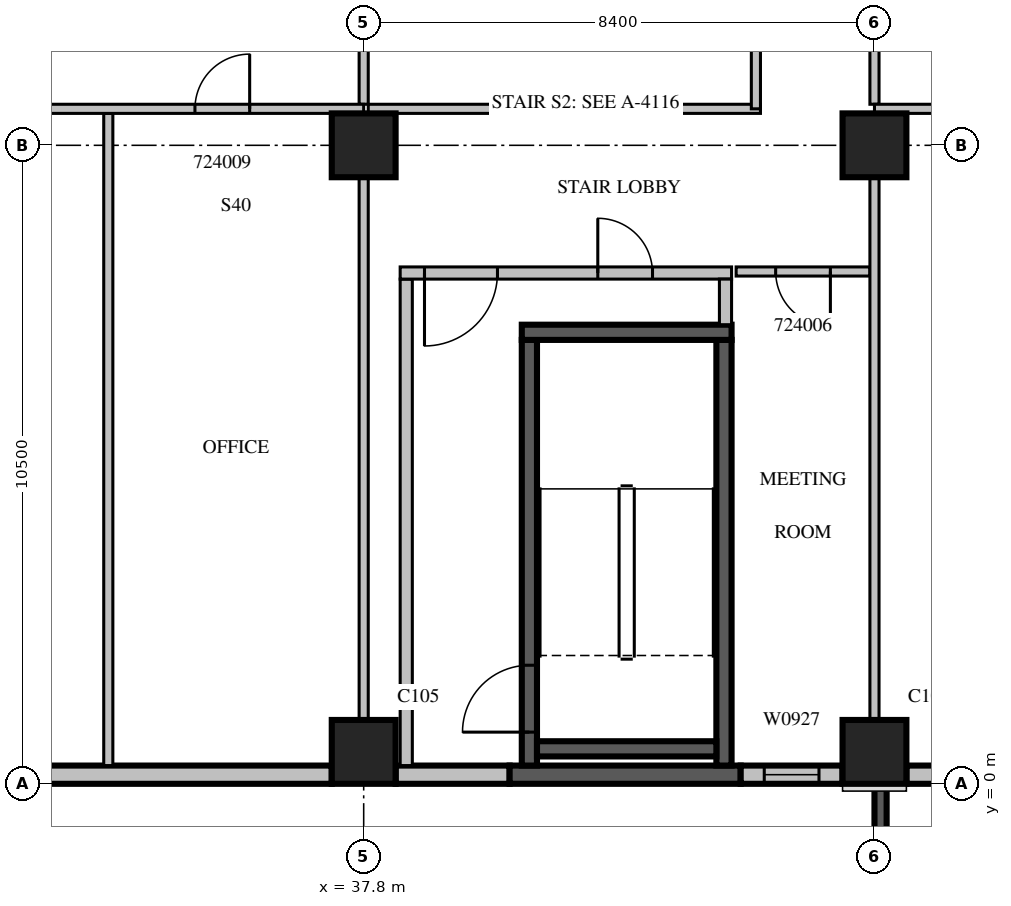
"""IFC4 building model, lengths in metres.
Left out: names, types, materials, properties, quantities, classifications, styles, units other than length and angle.
Written with IfcOpenShell. Run it as: python <this file> out.ifc"""

import sys

from ifc_helpers import new_model, si_unit, direction, frame, frame_2d, origin, origin_2d, place, context, subcontext, project, spatial, rectangle, extrude, source, transform, mapped, element, fill, save


model = new_model("IFC4")
c1 = context("Model", 3, precision=1e-05, world=origin(), true_north=direction((0.0, 1.0)))
c2 = subcontext(c1, "Body", "Model", "MODEL_VIEW")
j1 = project(units=[si_unit("LENGTHUNIT", "METRE"), si_unit("PLANEANGLEUNIT", "RADIAN")], contexts=[c1])
p1 = place(None, origin())
s1 = spatial("IfcSite", under=j1, at=p1, CompositionType="ELEMENT")
p2 = place(p1, origin())
s2 = spatial("IfcBuilding", under=s1, at=p2, CompositionType="ELEMENT")
p3 = place(p2, frame((0.0, 0.0, 111.9)))
s3 = spatial("IfcBuildingStorey", under=s2, at=p3, CompositionType="ELEMENT", Elevation=111.9)
m1 = source(origin(), c2, "Body", "SweptSolid", [
    extrude(rectangle(XDim=1.05, YDim=1.05, at=origin_2d()), origin(), (0.0, 0.0, 1.0), 4.2),
])
for number, where, z_axis, x_axis in (
    (1, (37.8, 0.525, 0.0), (0.0, 0.0, 1.0), (1.0, 0.0, 0.0)),
    (2, (46.2, 0.525, 0.0), (0.0, 0.0, 1.0), (1.0, 0.0, 0.0)),
    (3, (37.8, 10.5, 0.0), (0.0, 0.0, 1.0), (1.0, 0.0, 0.0)),
    (4, (46.2, 10.5, 0.0), (0.0, 0.0, 1.0), (1.0, 0.0, 0.0)),
):
    element("IfcColumn", number, at=place(p3, frame(where, z_axis=z_axis, x_axis=x_axis)), inside=s3, PredefinedType="COLUMN", context=c2, shape_type="MappedRepresentation", body=[
        mapped(m1, transform((0.0, 0.0, 0.0), scale=1.0)),
    ])
m2 = source(origin(), c2, "Body", "SweptSolid", [
    extrude(rectangle(XDim=3.9, YDim=0.2, at=frame_2d((1.95, 0.0))), origin(), (0.0, 0.0, 1.0), 3.8),
])
p4 = place(p3, frame((46.3, 0.0, 0.0), z_axis=(0.0, 0.0, 1.0), x_axis=(0.0, -1.0, 0.0)))
e5 = element("IfcWall", 5, at=p4, inside=s3, PredefinedType="SOLIDWALL", context=c2, shape_type="MappedRepresentation", body=[
    mapped(m2, transform((0.0, 0.0, 0.0), scale=1.0)),
])
m3 = source(origin(), c2, "Body", "SweptSolid", [
    extrude(rectangle(XDim=2.4, YDim=2.7, at=frame_2d((1.2, 1.35))), frame((0.0, 0.11, 0.0), z_axis=(0.0, -1.0, 0.0), x_axis=(1.0, 0.0, 0.0)), (0.0, 0.0, 1.0), 0.22),
])
p5 = place(p4, frame((0.75, 0.0, 0.6)))
e6 = element("IfcOpeningElement", 6, at=p5, cuts=e5, PredefinedType="OPENING", context=c2, shape_type="MappedRepresentation", body=[
    mapped(m3, transform((0.0, 0.0, 0.0), scale=1.0)),
])
m4 = source(origin(), c2, "Body", "SweptSolid", [
    extrude(rectangle(XDim=7.35, YDim=0.3, at=frame_2d((3.675, 0.0))), origin(), (0.0, 0.0, 1.0), 3.8),
])
p6 = place(p3, frame((29.925, 0.15, 0.0), z_axis=(0.0, 0.0, 1.0), x_axis=(1.0, 0.0, 0.0)))
e7 = element("IfcWall", 7, at=p6, inside=s3, PredefinedType="STANDARD", context=c2, shape_type="MappedRepresentation", body=[
    mapped(m4, transform((0.0, 0.0, 0.0), scale=1.0)),
])
m5 = source(origin(), c2, "Body", "SweptSolid", [
    extrude(rectangle(XDim=1.875, YDim=0.3, at=frame_2d((0.938, 0.0))), origin(), (0.0, 0.0, 1.0), 3.8),
])
p7 = place(p3, frame((38.325, 0.15, 0.0), z_axis=(0.0, 0.0, 1.0), x_axis=(1.0, 0.0, 0.0)))
e8 = element("IfcWall", 8, at=p7, inside=s3, PredefinedType="STANDARD", context=c2, shape_type="MappedRepresentation", body=[
    mapped(m5, transform((0.0, 0.0, 0.0), scale=1.0)),
])
m6 = source(origin(), c2, "Body", "SweptSolid", [
    extrude(rectangle(XDim=3.8, YDim=0.3, at=frame_2d((1.9, 0.0))), origin(), (0.0, 0.0, 1.0), 3.8),
])
p8 = place(p3, frame((40.2, 0.15, 0.0), z_axis=(0.0, 0.0, 1.0), x_axis=(1.0, 0.0, 0.0)))
e9 = element("IfcWall", 9, at=p8, inside=s3, PredefinedType="SOLIDWALL", context=c2, shape_type="MappedRepresentation", body=[
    mapped(m6, transform((0.0, 0.0, 0.0), scale=1.0)),
])
m7 = source(origin(), c2, "Body", "SweptSolid", [
    extrude(rectangle(XDim=1.675, YDim=0.3, at=frame_2d((0.838, 0.0))), origin(), (0.0, 0.0, 1.0), 3.8),
])
p9 = place(p3, frame((44.0, 0.15, 0.0), z_axis=(0.0, 0.0, 1.0), x_axis=(1.0, 0.0, 0.0)))
e10 = element("IfcWall", 10, at=p9, inside=s3, PredefinedType="STANDARD", context=c2, shape_type="MappedRepresentation", body=[
    mapped(m7, transform((0.0, 0.0, 0.0), scale=1.0)),
])
m8 = source(origin(), c2, "Body", "SweptSolid", [
    extrude(rectangle(XDim=0.9, YDim=2.7, at=frame_2d((0.45, 1.35))), frame((0.0, 0.16, 0.0), z_axis=(0.0, -1.0, 0.0), x_axis=(1.0, 0.0, 0.0)), (0.0, 0.0, 1.0), 0.32),
])
p10 = place(p9, frame((0.388, 0.0, 0.6)))
e11 = element("IfcOpeningElement", 11, at=p10, cuts=e10, PredefinedType="OPENING", context=c2, shape_type="MappedRepresentation", body=[
    mapped(m8, transform((0.0, 0.0, 0.0), scale=1.0)),
])
m9 = source(origin(), c2, "Body", "SweptSolid", [
    extrude(rectangle(XDim=4.83, YDim=0.3, at=frame_2d((2.415, 0.0))), origin(), (0.0, 0.0, 1.0), 3.8),
])
p11 = place(p3, frame((46.725, 0.15, 0.0), z_axis=(0.0, 0.0, 1.0), x_axis=(1.0, 0.0, 0.0)))
e12 = element("IfcWall", 12, at=p11, inside=s3, PredefinedType="STANDARD", context=c2, shape_type="MappedRepresentation", body=[
    mapped(m9, transform((0.0, 0.0, 0.0), scale=1.0)),
])
m10 = source(origin(), c2, "Body", "SweptSolid", [
    extrude(rectangle(XDim=1.0, YDim=2.1, at=frame_2d((0.5, 1.05))), frame((0.0, 0.16, 0.0), z_axis=(0.0, -1.0, 0.0), x_axis=(1.0, 0.0, 0.0)), (0.0, 0.0, 1.0), 0.32),
])
p12 = place(p11, frame((1.915, 0.0, 0.0)))
e13 = element("IfcOpeningElement", 13, at=p12, cuts=e12, PredefinedType="OPENING", context=c2, shape_type="MappedRepresentation", body=[
    mapped(m10, transform((0.0, 0.0, 0.0), scale=1.0)),
])
m11 = source(origin(), c2, "Body", "SweptSolid", [
    extrude(rectangle(XDim=7.0, YDim=0.25, at=frame_2d((3.5, 0.0))), origin(), (0.0, 0.0, 1.0), 3.8),
])
p13 = place(p3, frame((40.525, 0.3, 0.0), z_axis=(0.0, 0.0, 1.0), x_axis=(0.0, 1.0, 0.0)))
e14 = element("IfcWall", 14, at=p13, inside=s3, PredefinedType="SOLIDWALL", context=c2, shape_type="MappedRepresentation", body=[
    mapped(m11, transform((0.0, 0.0, 0.0), scale=1.0)),
])
m12 = source(origin(), c2, "Body", "SweptSolid", [
    extrude(rectangle(XDim=1.1, YDim=2.1, at=frame_2d((0.55, 1.05))), frame((0.0, 0.135, 0.0), z_axis=(0.0, -1.0, 0.0), x_axis=(1.0, 0.0, 0.0)), (0.0, 0.0, 1.0), 0.27),
])
p14 = place(p13, frame((0.55, 0.0, 0.0)))
e15 = element("IfcOpeningElement", 15, at=p14, cuts=e14, PredefinedType="OPENING", context=c2, shape_type="MappedRepresentation", body=[
    mapped(m12, transform((0.0, 0.0, 0.0), scale=1.0)),
])
p15 = place(p3, frame((43.725, 0.3, 0.0), z_axis=(0.0, 0.0, 1.0), x_axis=(0.0, 1.0, 0.0)))
e16 = element("IfcWall", 16, at=p15, inside=s3, PredefinedType="SOLIDWALL", context=c2, shape_type="MappedRepresentation", body=[
    mapped(m11, transform((0.0, 0.0, 0.0), scale=1.0)),
])
m13 = source(origin(), c2, "Body", "SweptSolid", [
    extrude(rectangle(XDim=3.45, YDim=0.25, at=frame_2d((1.725, 0.0))), origin(), (0.0, 0.0, 1.0), 3.8),
])
p16 = place(p3, frame((40.4, 7.425, 0.0), z_axis=(0.0, 0.0, 1.0), x_axis=(1.0, 0.0, 0.0)))
e17 = element("IfcWall", 17, at=p16, inside=s3, PredefinedType="SOLIDWALL", context=c2, shape_type="MappedRepresentation", body=[
    mapped(m13, transform((0.0, 0.0, 0.0), scale=1.0)),
])
m14 = source(origin(), c2, "Body", "SweptSolid", [
    extrude(rectangle(XDim=2.95, YDim=0.25, at=frame_2d((1.475, 0.0))), origin(), (0.0, 0.0, 1.0), 3.8),
])
p17 = place(p3, frame((40.65, 0.575, 0.0), z_axis=(0.0, 0.0, 1.0), x_axis=(1.0, 0.0, 0.0)))
e18 = element("IfcWall", 18, at=p17, inside=s3, PredefinedType="SOLIDWALL", context=c2, shape_type="MappedRepresentation", body=[
    mapped(m14, transform((0.0, 0.0, 0.0), scale=1.0)),
])
m15 = source(origin(), c2, "Body", "SweptSolid", [
    extrude(rectangle(XDim=8.0, YDim=0.2, at=frame_2d((4.0, 0.0))), origin(), (0.0, 0.0, 1.0), 3.8),
])
p18 = place(p3, frame((38.5, 0.3, 0.0), z_axis=(0.0, 0.0, 1.0), x_axis=(0.0, 1.0, 0.0)))
e19 = element("IfcWall", 19, at=p18, inside=s3, PredefinedType="PARTITIONING", context=c2, shape_type="MappedRepresentation", body=[
    mapped(m15, transform((0.0, 0.0, 0.0), scale=1.0)),
])
m16 = source(origin(), c2, "Body", "SweptSolid", [
    extrude(rectangle(XDim=5.45, YDim=0.2, at=frame_2d((2.725, 0.0))), origin(), (0.0, 0.0, 1.0), 3.8),
])
p19 = place(p3, frame((38.4, 8.4, 0.0), z_axis=(0.0, 0.0, 1.0), x_axis=(1.0, 0.0, 0.0)))
e20 = element("IfcWall", 20, at=p19, inside=s3, PredefinedType="PARTITIONING", context=c2, shape_type="MappedRepresentation", body=[
    mapped(m16, transform((0.0, 0.0, 0.0), scale=1.0)),
])
m17 = source(origin(), c2, "Body", "SweptSolid", [
    extrude(rectangle(XDim=1.2, YDim=2.1, at=frame_2d((0.6, 1.05))), frame((0.0, 0.11, 0.0), z_axis=(0.0, -1.0, 0.0), x_axis=(1.0, 0.0, 0.0)), (0.0, 0.0, 1.0), 0.22),
])
p20 = place(p19, frame((0.4, 0.0, 0.0)))
e21 = element("IfcOpeningElement", 21, at=p20, cuts=e20, PredefinedType="OPENING", context=c2, shape_type="MappedRepresentation", body=[
    mapped(m17, transform((0.0, 0.0, 0.0), scale=1.0)),
])
m18 = source(origin(), c2, "Body", "SweptSolid", [
    extrude(rectangle(XDim=0.9, YDim=2.1, at=frame_2d((0.45, 1.05))), frame((0.0, 0.11, 0.0), z_axis=(0.0, -1.0, 0.0), x_axis=(1.0, 0.0, 0.0)), (0.0, 0.0, 1.0), 0.22),
])
p21 = place(p19, frame((3.25, 0.0, 0.0)))
e22 = element("IfcOpeningElement", 22, at=p21, cuts=e20, PredefinedType="OPENING", context=c2, shape_type="MappedRepresentation", body=[
    mapped(m18, transform((0.0, 0.0, 0.0), scale=1.0)),
])
m19 = source(origin(), c2, "Body", "SweptSolid", [
    extrude(rectangle(XDim=0.75, YDim=0.2, at=frame_2d((0.375, 0.0))), origin(), (0.0, 0.0, 1.0), 3.8),
])
p22 = place(p3, frame((43.75, 7.55, 0.0), z_axis=(0.0, 0.0, 1.0), x_axis=(0.0, 1.0, 0.0)))
e23 = element("IfcWall", 23, at=p22, inside=s3, PredefinedType="PARTITIONING", context=c2, shape_type="MappedRepresentation", body=[
    mapped(m19, transform((0.0, 0.0, 0.0), scale=1.0)),
])
m20 = source(origin(), c2, "Body", "SweptSolid", [
    extrude(rectangle(XDim=6.45, YDim=0.15, at=frame_2d((3.225, 0.0))), origin(), (0.0, 0.0, 1.0), 3.8),
])
p23 = place(p3, frame((37.875, 11.1, 0.0), z_axis=(0.0, 0.0, 1.0), x_axis=(1.0, 0.0, 0.0)))
e24 = element("IfcWall", 24, at=p23, inside=s3, PredefinedType="PARTITIONING", context=c2, shape_type="MappedRepresentation", body=[
    mapped(m20, transform((0.0, 0.0, 0.0), scale=1.0)),
])
m21 = source(origin(), c2, "Body", "SweptSolid", [
    extrude(rectangle(XDim=3.675, YDim=0.15, at=frame_2d((1.837, 0.0))), origin(), (0.0, 0.0, 1.0), 3.8),
])
p24 = place(p3, frame((44.25, 11.1, 0.0), z_axis=(0.0, 0.0, 1.0), x_axis=(0.0, 1.0, 0.0)))
e25 = element("IfcWall", 25, at=p24, inside=s3, PredefinedType="PARTITIONING", context=c2, shape_type="MappedRepresentation", body=[
    mapped(m21, transform((0.0, 0.0, 0.0), scale=1.0)),
])
m22 = source(origin(), c2, "Body", "SweptSolid", [
    extrude(rectangle(XDim=2.2, YDim=0.15, at=frame_2d((1.1, 0.0))), origin(), (0.0, 0.0, 1.0), 3.8),
])
p25 = place(p3, frame((46.125, 8.425, 0.0), z_axis=(0.0, 0.0, 1.0), x_axis=(-1.0, 0.0, 0.0)))
e26 = element("IfcWall", 26, at=p25, inside=s3, PredefinedType="PARTITIONING", context=c2, shape_type="MappedRepresentation", body=[
    mapped(m22, transform((0.0, 0.0, 0.0), scale=1.0)),
])
m23 = source(origin(), c2, "Body", "SweptSolid", [
    extrude(rectangle(XDim=0.9, YDim=2.1, at=frame_2d((0.45, 1.05))), frame((0.0, 0.085, 0.0), z_axis=(0.0, -1.0, 0.0), x_axis=(1.0, 0.0, 0.0)), (0.0, 0.0, 1.0), 0.17),
])
p26 = place(p25, frame((0.65, 0.0, 0.0)))
e27 = element("IfcOpeningElement", 27, at=p26, cuts=e26, PredefinedType="OPENING", context=c2, shape_type="MappedRepresentation", body=[
    mapped(m23, transform((0.0, 0.0, 0.0), scale=1.0)),
])
m24 = source(origin(), c2, "Body", "SweptSolid", [
    extrude(rectangle(XDim=10.725, YDim=0.15, at=frame_2d((5.362, 0.0))), origin(), (0.0, 0.0, 1.0), 3.8),
])
p27 = place(p3, frame((33.6, 0.3, 0.0), z_axis=(0.0, 0.0, 1.0), x_axis=(0.0, 1.0, 0.0)))
e28 = element("IfcWall", 28, at=p27, inside=s3, PredefinedType="PARTITIONING", context=c2, shape_type="MappedRepresentation", body=[
    mapped(m24, transform((0.0, 0.0, 0.0), scale=1.0)),
])
m25 = source(origin(), c2, "Body", "SweptSolid", [
    extrude(rectangle(XDim=8.927, YDim=0.15, at=frame_2d((4.463, 0.0))), origin(), (0.0, 0.0, 1.0), 3.8),
])
p28 = place(p3, frame((37.8, 1.049, 0.0), z_axis=(0.0, 0.0, 1.0), x_axis=(0.0, 1.0, 0.0)))
e29 = element("IfcWall", 29, at=p28, inside=s3, PredefinedType="PARTITIONING", context=c2, shape_type="MappedRepresentation", body=[
    mapped(m25, transform((0.0, 0.0, 0.0), scale=1.0)),
])
m26 = source(origin(), c2, "Body", "SweptSolid", [
    extrude(rectangle(XDim=3.525, YDim=0.15, at=frame_2d((1.762, 0.0))), origin(), (0.0, 0.0, 1.0), 3.8),
])
p29 = place(p3, frame((37.8, 11.175, 0.0), z_axis=(0.0, 0.0, 1.0), x_axis=(0.0, 1.0, 0.0)))
e30 = element("IfcWall", 30, at=p29, inside=s3, PredefinedType="PARTITIONING", context=c2, shape_type="MappedRepresentation", body=[
    mapped(m26, transform((0.0, 0.0, 0.0), scale=1.0)),
])
m27 = source(origin(), c2, "Body", "SweptSolid", [
    extrude(rectangle(XDim=8.4, YDim=0.15, at=frame_2d((4.2, 0.0))), origin(), (0.0, 0.0, 1.0), 3.8),
])
p30 = place(p3, frame((37.8, 11.1, 0.0), z_axis=(0.0, 0.0, 1.0), x_axis=(-1.0, 0.0, 0.0)))
e31 = element("IfcWall", 31, at=p30, inside=s3, PredefinedType="PARTITIONING", context=c2, shape_type="MappedRepresentation", body=[
    mapped(m27, transform((0.0, 0.0, 0.0), scale=1.0)),
])
p31 = place(p30, frame((5.575, 0.0, 0.0)))
e32 = element("IfcOpeningElement", 32, at=p31, cuts=e31, PredefinedType="OPENING", context=c2, shape_type="MappedRepresentation", body=[
    mapped(m23, transform((0.0, 0.0, 0.0), scale=1.0)),
])
p32 = place(p30, frame((1.875, 0.0, 0.0)))
e33 = element("IfcOpeningElement", 33, at=p32, cuts=e31, PredefinedType="OPENING", context=c2, shape_type="MappedRepresentation", body=[
    mapped(m23, transform((0.0, 0.0, 0.0), scale=1.0)),
])
p33 = place(p3, frame((46.2, 1.049, 0.0), z_axis=(0.0, 0.0, 1.0), x_axis=(0.0, 1.0, 0.0)))
e34 = element("IfcWall", 34, at=p33, inside=s3, PredefinedType="PARTITIONING", context=c2, shape_type="MappedRepresentation", body=[
    mapped(m25, transform((0.0, 0.0, 0.0), scale=1.0)),
])
p34 = place(p3, frame((46.2, 11.175, 0.0), z_axis=(0.0, 0.0, 1.0), x_axis=(0.0, 1.0, 0.0)))
e35 = element("IfcWall", 35, at=p34, inside=s3, PredefinedType="PARTITIONING", context=c2, shape_type="MappedRepresentation", body=[
    mapped(m26, transform((0.0, 0.0, 0.0), scale=1.0)),
])
m28 = source(origin(), c2, "Body", "SweptSolid", [
    extrude(rectangle(XDim=24.9, YDim=0.15, at=frame_2d((12.45, 0.0))), origin(), (0.0, 0.0, 1.0), 3.8),
])
p35 = place(p3, frame((71.1, 11.1, 0.0), z_axis=(0.0, 0.0, 1.0), x_axis=(-1.0, 0.0, 0.0)))
e36 = element("IfcWall", 36, at=p35, inside=s3, PredefinedType="PARTITIONING", context=c2, shape_type="MappedRepresentation", body=[
    mapped(m28, transform((0.0, 0.0, 0.0), scale=1.0)),
])
m29 = source(origin(), c2, "Body", "SweptSolid", [
    extrude(rectangle(XDim=1.1, YDim=2.1, at=frame_2d((0.55, 1.05))), frame((0.0, 0.085, 0.0), z_axis=(0.0, -1.0, 0.0), x_axis=(1.0, 0.0, 0.0)), (0.0, 0.0, 1.0), 0.17),
])
p36 = place(p35, frame((21.41, 0.0, 0.0)))
e37 = element("IfcOpeningElement", 37, at=p36, cuts=e36, PredefinedType="OPENING", context=c2, shape_type="MappedRepresentation", body=[
    mapped(m29, transform((0.0, 0.0, 0.0), scale=1.0)),
])
p37 = place(p35, frame((2.205, 0.0, 0.0)))
e38 = element("IfcOpeningElement", 38, at=p37, cuts=e36, PredefinedType="OPENING", context=c2, shape_type="MappedRepresentation", body=[
    mapped(m23, transform((0.0, 0.0, 0.0), scale=1.0)),
])
m30 = source(origin(), c2, "Body", "SweptSolid", [
    extrude(rectangle(XDim=0.9, YDim=2.7, at=frame_2d((0.45, 1.35))), frame((0.0, 0.03, 0.0), z_axis=(0.0, -1.0, 0.0), x_axis=(1.0, 0.0, 0.0)), (0.0, 0.0, 1.0), 0.06),
])
p38 = place(p10, origin())
e39 = element("IfcWindow", 39, at=p38, inside=s3, PartitioningType="SINGLE_PANEL", PredefinedType="WINDOW", context=c2, shape_type="MappedRepresentation", body=[
    mapped(m30, transform((0.0, 0.0, 0.0), scale=1.0)),
])
fill(e11, e39)
m31 = source(origin(), c2, "Body", "SweptSolid", [
    extrude(rectangle(XDim=1.1, YDim=2.1, at=frame_2d((0.55, 1.05))), frame((0.0, 0.025, 0.0), z_axis=(0.0, -1.0, 0.0), x_axis=(1.0, 0.0, 0.0)), (0.0, 0.0, 1.0), 0.05),
])
p39 = place(p14, origin())
e40 = element("IfcDoor", 40, at=p39, inside=s3, OperationType="SINGLE_SWING_LEFT", PredefinedType="DOOR", context=c2, shape_type="MappedRepresentation", body=[
    mapped(m31, transform((0.0, 0.0, 0.0), scale=1.0)),
])
fill(e15, e40)
m32 = source(origin(), c2, "Body", "SweptSolid", [
    extrude(rectangle(XDim=1.2, YDim=2.1, at=frame_2d((0.6, 1.05))), frame((0.0, 0.025, 0.0), z_axis=(0.0, -1.0, 0.0), x_axis=(1.0, 0.0, 0.0)), (0.0, 0.0, 1.0), 0.05),
])
p40 = place(p20, origin())
e41 = element("IfcDoor", 41, at=p40, inside=s3, OperationType="SINGLE_SWING_RIGHT", PredefinedType="DOOR", context=c2, shape_type="MappedRepresentation", body=[
    mapped(m32, transform((0.0, 0.0, 0.0), scale=1.0)),
])
fill(e21, e41)
m33 = source(origin(), c2, "Body", "SweptSolid", [
    extrude(rectangle(XDim=0.9, YDim=2.1, at=frame_2d((0.45, 1.05))), frame((0.0, 0.025, 0.0), z_axis=(0.0, -1.0, 0.0), x_axis=(1.0, 0.0, 0.0)), (0.0, 0.0, 1.0), 0.05),
])
p41 = place(p21, origin())
e42 = element("IfcDoor", 42, at=p41, inside=s3, OperationType="SINGLE_SWING_LEFT", PredefinedType="DOOR", context=c2, shape_type="MappedRepresentation", body=[
    mapped(m33, transform((0.0, 0.0, 0.0), scale=1.0)),
])
fill(e22, e42)
p42 = place(p26, origin())
e43 = element("IfcDoor", 43, at=p42, inside=s3, OperationType="SINGLE_SWING_LEFT", PredefinedType="DOOR", context=c2, shape_type="MappedRepresentation", body=[
    mapped(m33, transform((0.0, 0.0, 0.0), scale=1.0)),
])
fill(e27, e43)
p43 = place(p32, origin())
e44 = element("IfcDoor", 44, at=p43, inside=s3, OperationType="SINGLE_SWING_RIGHT", PredefinedType="DOOR", context=c2, shape_type="MappedRepresentation", body=[
    mapped(m33, transform((0.0, 0.0, 0.0), scale=1.0)),
])
fill(e33, e44)
save(model, sys.argv[1])
